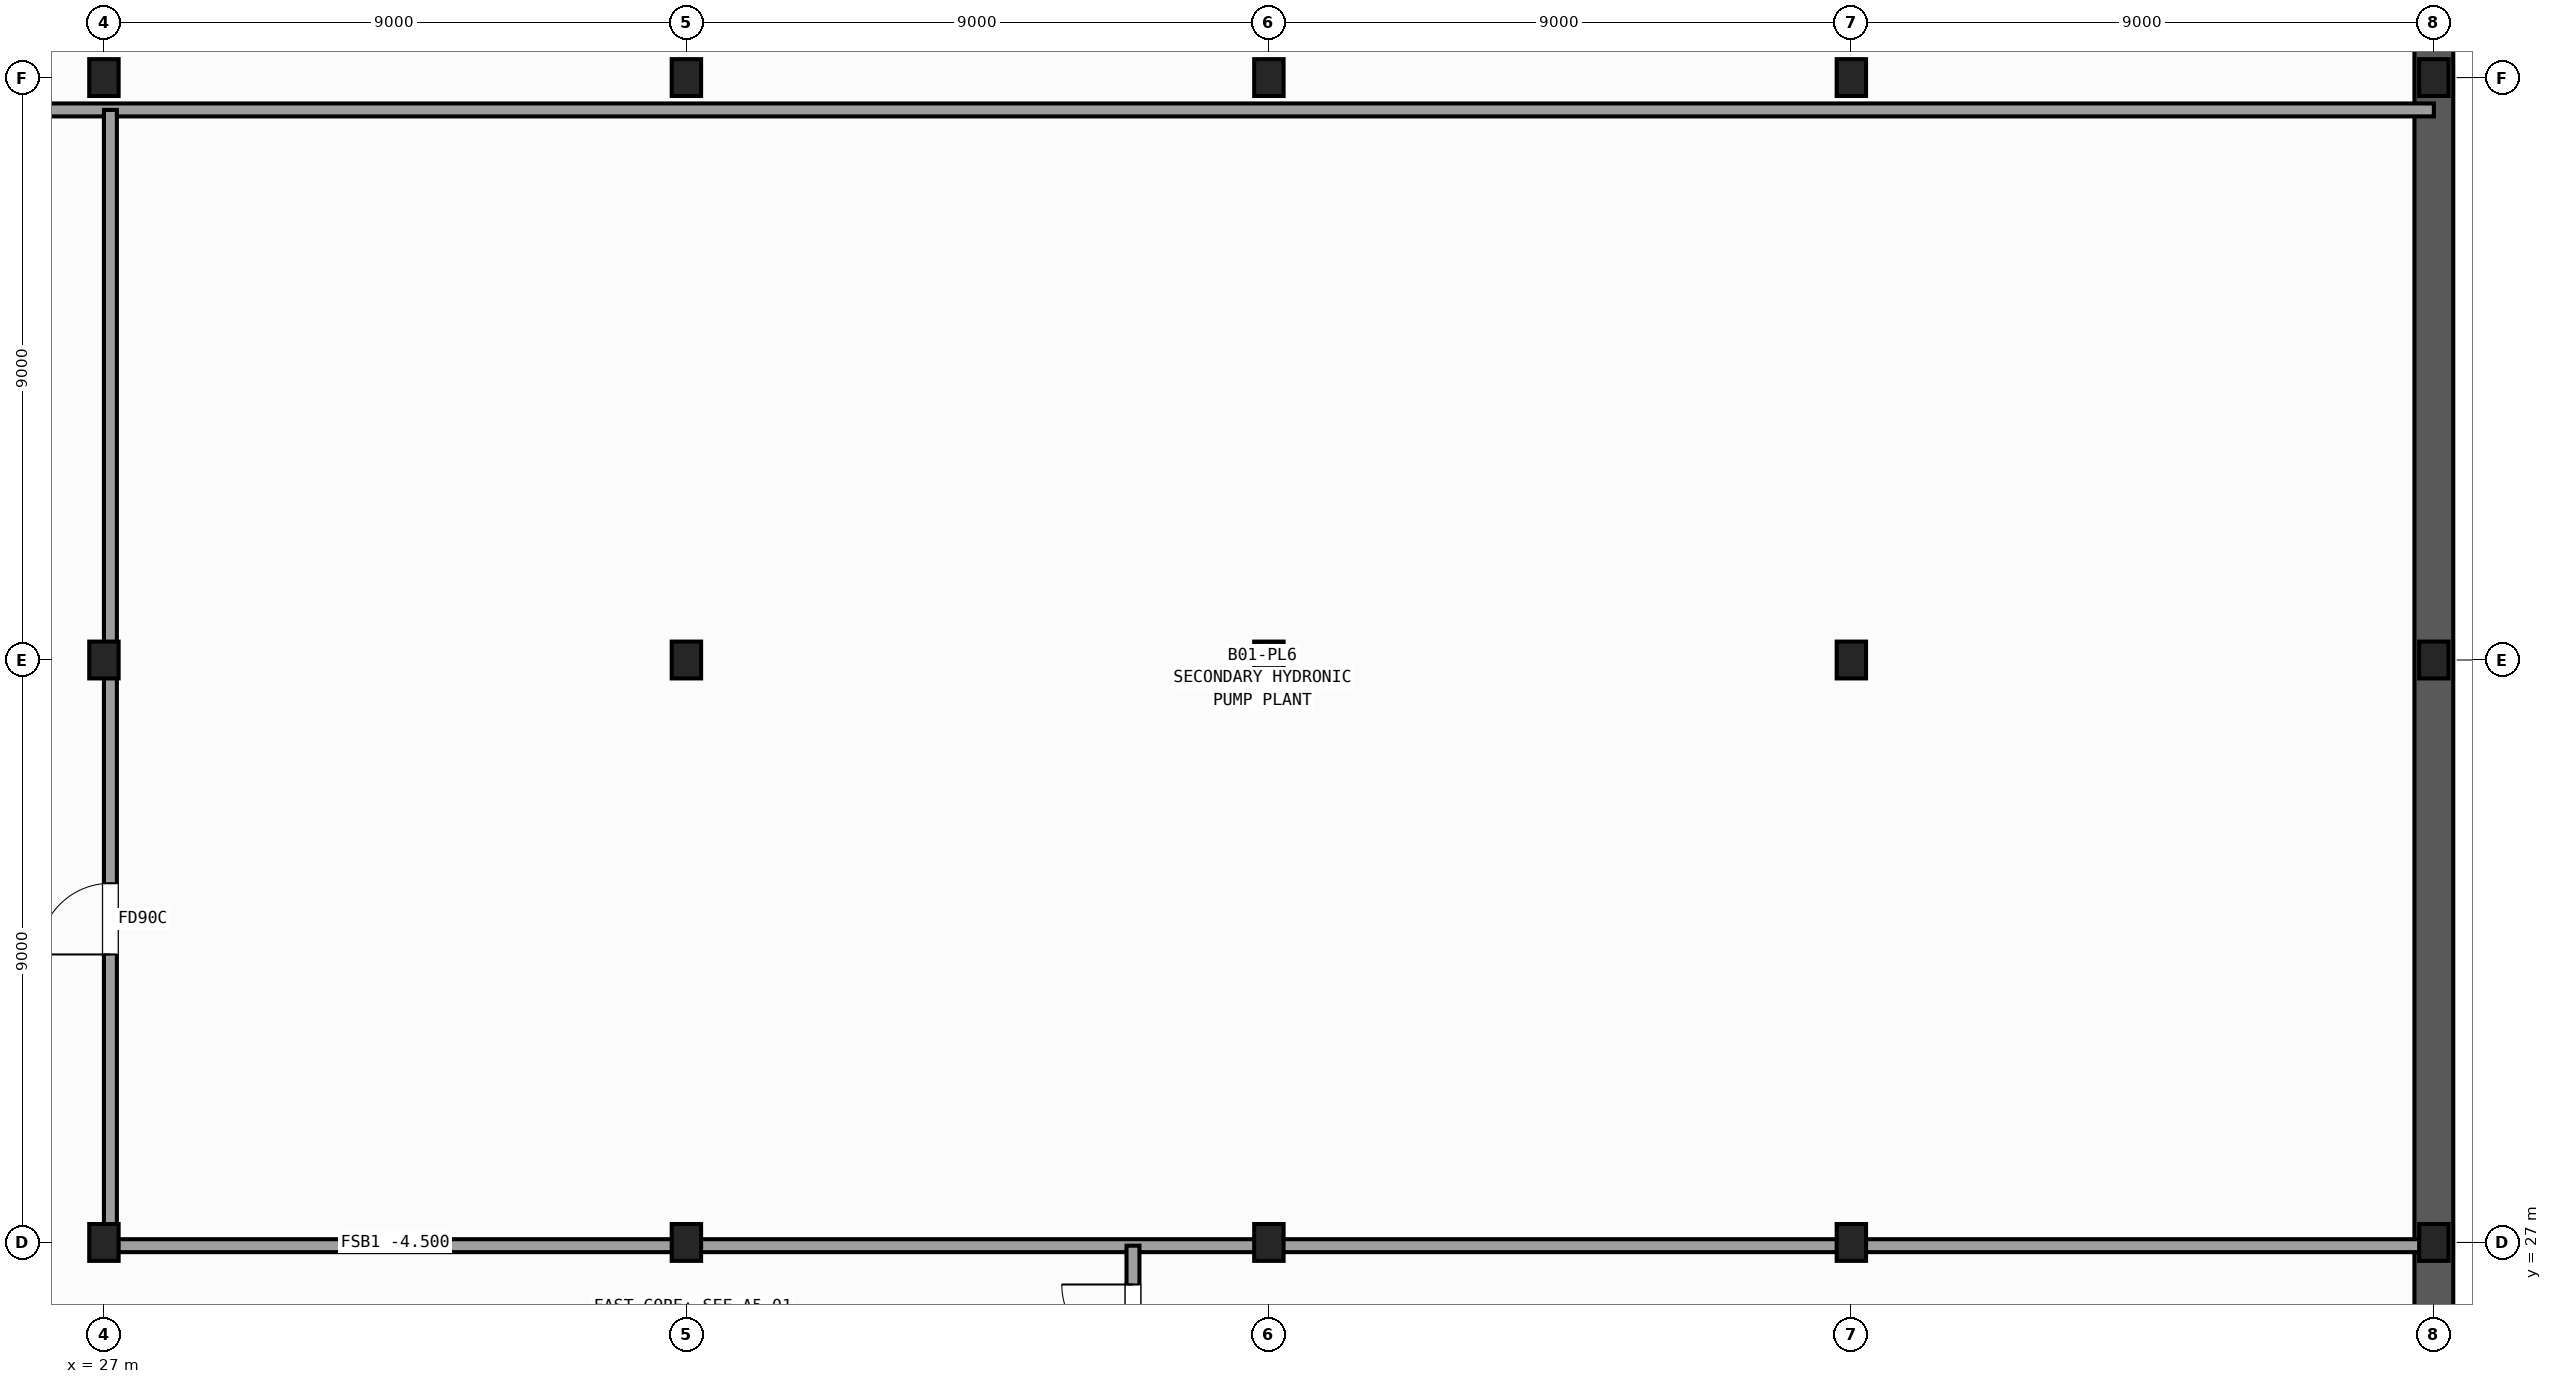
"""IFC4 building model, lengths in metres.
Left out: names, types, materials, properties, quantities, classifications, styles, units other than length and angle.
Written with IfcOpenShell. Run it as: python <this file> out.ifc"""

import sys

from ifc_helpers import new_model, si_unit, direction, frame, frame_2d, origin, origin_2d, place, context, subcontext, project, spatial, rectangle, i_section, extrude, element, fill, save


model = new_model("IFC4")
c1 = context("Model", 3, precision=1e-05, world=origin(), true_north=direction((0.0, 1.0)))
c2 = subcontext(c1, "Body", "Model", "MODEL_VIEW")
j1 = project(units=[si_unit("LENGTHUNIT", "METRE"), si_unit("PLANEANGLEUNIT", "RADIAN")], contexts=[c1])
p1 = place(None, origin())
s1 = spatial("IfcSite", under=j1, at=p1, CompositionType="ELEMENT")
p2 = place(p1, origin())
s2 = spatial("IfcBuilding", under=s1, at=p2, CompositionType="ELEMENT")
p3 = place(p2, frame((0.0, 0.0, -4.5)))
s3 = spatial("IfcBuildingStorey", under=s2, at=p3, CompositionType="ELEMENT", Elevation=-4.5)
for number, where, z_axis, x_axis in (
    (1, (27.0, 27.0, 0.0), (0.0, 0.0, 1.0), (1.0, 0.0, 0.0)),
    (2, (27.0, 36.0, 0.0), (0.0, 0.0, 1.0), (1.0, 0.0, 0.0)),
    (3, (27.0, 45.0, 0.0), (0.0, 0.0, 1.0), (1.0, 0.0, 0.0)),
    (4, (36.0, 27.0, 0.0), (0.0, 0.0, 1.0), (1.0, 0.0, 0.0)),
    (5, (36.0, 36.0, 0.0), (0.0, 0.0, 1.0), (1.0, 0.0, 0.0)),
    (6, (36.0, 45.0, 0.0), (0.0, 0.0, 1.0), (1.0, 0.0, 0.0)),
    (7, (45.0, 27.0, 0.0), (0.0, 0.0, 1.0), (1.0, 0.0, 0.0)),
    (8, (45.0, 36.0, 0.0), (0.0, 0.0, 1.0), (1.0, 0.0, 0.0)),
    (9, (45.0, 45.0, 0.0), (0.0, 0.0, 1.0), (1.0, 0.0, 0.0)),
    (10, (54.0, 27.0, 0.0), (0.0, 0.0, 1.0), (1.0, 0.0, 0.0)),
    (11, (54.0, 36.0, 0.0), (0.0, 0.0, 1.0), (1.0, 0.0, 0.0)),
    (12, (54.0, 45.0, 0.0), (0.0, 0.0, 1.0), (1.0, 0.0, 0.0)),
    (13, (63.0, 27.0, 0.0), (0.0, 0.0, 1.0), (1.0, 0.0, 0.0)),
    (14, (63.0, 36.0, 0.0), (0.0, 0.0, 1.0), (1.0, 0.0, 0.0)),
    (15, (63.0, 45.0, 0.0), (0.0, 0.0, 1.0), (1.0, 0.0, 0.0)),
):
    element("IfcColumn", number, at=place(p3, frame(where, z_axis=z_axis, x_axis=x_axis)), inside=s3, PredefinedType="COLUMN", context=c2, shape_type="SweptSolid", body=[
        extrude(i_section(OverallWidth=0.454, OverallDepth=0.569, WebThickness=0.078, FlangeThickness=0.125, FilletRadius=0.015, at=origin_2d()), origin(), (0.0, 0.0, 1.0), 4.5),
    ])
p4 = place(p3, frame((63.0, 54.3, 0.0), z_axis=(0.0, 0.0, 1.0), x_axis=(0.0, -1.0, 0.0)))
e16 = element("IfcWall", 16, at=p4, inside=s3, PredefinedType="SOLIDWALL", context=c2, shape_type="SweptSolid", body=[
    extrude(rectangle(XDim=54.6, YDim=0.6, at=frame_2d((27.3, 0.0))), origin(), (0.0, 0.0, 1.0), 4.18),
])
p5 = place(p3, frame((11.1, 44.5, 0.0), z_axis=(0.0, 0.0, 1.0), x_axis=(1.0, 0.0, 0.0)))
e17 = element("IfcWall", 17, at=p5, inside=s3, PredefinedType="PARTITIONING", context=c2, shape_type="SweptSolid", body=[
    extrude(rectangle(XDim=51.9, YDim=0.2, at=frame_2d((25.95, 0.0))), origin(), (0.0, 0.0, 1.0), 3.305),
])
p6 = place(p5, frame((3.5, 0.0, 0.0)))
e18 = element("IfcOpeningElement", 18, at=p6, cuts=e17, PredefinedType="OPENING", context=c2, shape_type="SweptSolid", body=[
    extrude(rectangle(XDim=1.1, YDim=2.15, at=frame_2d((0.55, 1.075))), frame((0.0, 0.11, 0.0), z_axis=(0.0, -1.0, 0.0), x_axis=(1.0, 0.0, 0.0)), (0.0, 0.0, 1.0), 0.22),
])
p7 = place(p3, frame((27.1, 26.95, 0.0), z_axis=(0.0, 0.0, 1.0), x_axis=(0.0, 1.0, 0.0)))
e19 = element("IfcWall", 19, at=p7, inside=s3, PredefinedType="PARTITIONING", context=c2, shape_type="SweptSolid", body=[
    extrude(rectangle(XDim=17.55, YDim=0.2, at=frame_2d((8.775, 0.0))), origin(), (0.0, 0.0, 1.0), 3.233),
])
p8 = place(p7, frame((4.5, 0.0, 0.0)))
e20 = element("IfcOpeningElement", 20, at=p8, cuts=e19, PredefinedType="OPENING", context=c2, shape_type="SweptSolid", body=[
    extrude(rectangle(XDim=1.1, YDim=2.15, at=frame_2d((0.55, 1.075))), frame((0.0, 0.11, 0.0), z_axis=(0.0, -1.0, 0.0), x_axis=(1.0, 0.0, 0.0)), (0.0, 0.0, 1.0), 0.22),
])
p9 = place(p3, frame((27.1, 26.95, 0.0), z_axis=(0.0, 0.0, 1.0), x_axis=(1.0, 0.0, 0.0)))
e21 = element("IfcWall", 21, at=p9, inside=s3, PredefinedType="PARTITIONING", context=c2, shape_type="SweptSolid", body=[
    extrude(rectangle(XDim=35.9, YDim=0.2, at=frame_2d((17.95, 0.0))), origin(), (0.0, 0.0, 1.0), 3.233),
])
p10 = place(p3, frame((42.9, 24.6, 0.0), z_axis=(0.0, 0.0, 1.0), x_axis=(0.0, 1.0, 0.0)))
e22 = element("IfcWall", 22, at=p10, inside=s3, PredefinedType="PARTITIONING", context=c2, shape_type="SweptSolid", body=[
    extrude(rectangle(XDim=2.35, YDim=0.2, at=frame_2d((1.175, 0.0))), origin(), (0.0, 0.0, 1.0), 3.233),
])
p11 = place(p10, frame((0.65, 0.0, 0.0)))
e23 = element("IfcOpeningElement", 23, at=p11, cuts=e22, PredefinedType="OPENING", context=c2, shape_type="SweptSolid", body=[
    extrude(rectangle(XDim=1.1, YDim=2.15, at=frame_2d((0.55, 1.075))), frame((0.0, 0.11, 0.0), z_axis=(0.0, -1.0, 0.0), x_axis=(1.0, 0.0, 0.0)), (0.0, 0.0, 1.0), 0.22),
])
p12 = place(p11, origin())
e24 = element("IfcDoor", 24, at=p12, inside=s3, OperationType="SINGLE_SWING_RIGHT", PredefinedType="DOOR", context=c2, shape_type="SweptSolid", body=[
    extrude(rectangle(XDim=1.1, YDim=2.15, at=frame_2d((0.55, 1.075))), frame((0.0, 0.025, 0.0), z_axis=(0.0, -1.0, 0.0), x_axis=(1.0, 0.0, 0.0)), (0.0, 0.0, 1.0), 0.05),
])
fill(e23, e24)
p13 = place(p8, origin())
e25 = element("IfcDoor", 25, at=p13, inside=s3, OperationType="SINGLE_SWING_LEFT", PredefinedType="DOOR", context=c2, shape_type="SweptSolid", body=[
    extrude(rectangle(XDim=1.1, YDim=2.15, at=frame_2d((0.55, 1.075))), frame((0.0, 0.025, 0.0), z_axis=(0.0, -1.0, 0.0), x_axis=(1.0, 0.0, 0.0)), (0.0, 0.0, 1.0), 0.05),
])
fill(e20, e25)
save(model, sys.argv[1])
